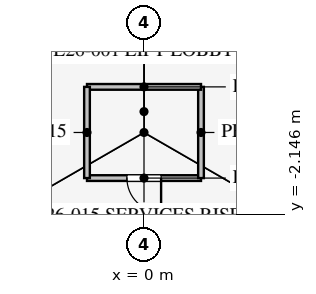
"""IFC4 building model, lengths in metres.
Left out: names, types, materials, properties, quantities, classifications, styles, units other than length and angle.
Written with IfcOpenShell. Run it as: python <this file> out.ifc"""

import sys

from ifc_helpers import new_model, si_unit, direction, frame, frame_2d, origin, place, context, subcontext, project, spatial, rectangle, extrude, element, fill, save


model = new_model("IFC4")
c1 = context("Model", 3, precision=1e-05, world=origin(), true_north=direction((0.0, 1.0)))
c2 = subcontext(c1, "Body", "Model", "MODEL_VIEW")
j1 = project(units=[si_unit("LENGTHUNIT", "METRE"), si_unit("PLANEANGLEUNIT", "RADIAN")], contexts=[c1])
p1 = place(None, origin())
s1 = spatial("IfcSite", under=j1, at=p1, CompositionType="ELEMENT")
p2 = place(p1, origin())
s2 = spatial("IfcBuilding", under=s1, at=p2, CompositionType="ELEMENT")
p3 = place(p2, frame((0.0, 0.0, 115.7)))
s3 = spatial("IfcBuildingStorey", under=s2, at=p3, CompositionType="ELEMENT", Elevation=115.7)
p4 = place(p3, frame((-1.5, -1.2, 0.0), z_axis=(0.0, 0.0, 1.0), x_axis=(1.0, 0.0, 0.0)))
e1 = element("IfcWall", 1, at=p4, inside=s3, PredefinedType="PARTITIONING", context=c2, shape_type="SweptSolid", body=[
    extrude(rectangle(XDim=3.0, YDim=0.15, at=frame_2d((1.5, 0.0))), origin(), (0.0, 0.0, 1.0), 4.0),
])
p5 = place(p4, frame((1.05, 0.0, 0.0)))
e2 = element("IfcOpeningElement", 2, at=p5, cuts=e1, PredefinedType="OPENING", context=c2, shape_type="SweptSolid", body=[
    extrude(rectangle(XDim=0.9, YDim=2.1, at=frame_2d((0.45, 1.05))), frame((0.0, 0.085, 0.0), z_axis=(0.0, -1.0, 0.0), x_axis=(1.0, 0.0, 0.0)), (0.0, 0.0, 1.0), 0.17),
])
p6 = place(p3, frame((1.5, -1.2, 0.0), z_axis=(0.0, 0.0, 1.0), x_axis=(0.0, 1.0, 0.0)))
e3 = element("IfcWall", 3, at=p6, inside=s3, PredefinedType="PARTITIONING", context=c2, shape_type="SweptSolid", body=[
    extrude(rectangle(XDim=2.4, YDim=0.15, at=frame_2d((1.2, 0.0))), origin(), (0.0, 0.0, 1.0), 4.0),
])
p7 = place(p3, frame((1.5, 1.2, 0.0), z_axis=(0.0, 0.0, 1.0), x_axis=(-1.0, 0.0, 0.0)))
e4 = element("IfcWall", 4, at=p7, inside=s3, PredefinedType="PARTITIONING", context=c2, shape_type="SweptSolid", body=[
    extrude(rectangle(XDim=3.0, YDim=0.15, at=frame_2d((1.5, 0.0))), origin(), (0.0, 0.0, 1.0), 4.0),
])
p8 = place(p3, frame((-1.5, 1.2, 0.0), z_axis=(0.0, 0.0, 1.0), x_axis=(0.0, -1.0, 0.0)))
e5 = element("IfcWall", 5, at=p8, inside=s3, PredefinedType="PARTITIONING", context=c2, shape_type="SweptSolid", body=[
    extrude(rectangle(XDim=2.4, YDim=0.15, at=frame_2d((1.2, 0.0))), origin(), (0.0, 0.0, 1.0), 4.0),
])
p9 = place(p3, frame((26.415, -15.231, 0.0), z_axis=(0.0, 0.0, 1.0), x_axis=(-0.50000091641, 0.866024874695, 0.0)))
e6 = element("IfcWall", 6, at=p9, inside=s3, PredefinedType="PARTITIONING", context=c2, shape_type="SweptSolid", body=[
    extrude(rectangle(XDim=52.796, YDim=0.12, at=frame_2d((26.398, 0.0))), origin(), (0.0, 0.0, 1.0), 2.9),
])
p10 = place(p9, frame((10.2, 0.0, 0.15)))
e7 = element("IfcOpeningElement", 7, at=p10, cuts=e6, PredefinedType="OPENING", context=c2, shape_type="SweptSolid", body=[
    extrude(rectangle(XDim=1.8, YDim=2.1, at=frame_2d((0.9, 1.05))), frame((0.0, 0.07, 0.0), z_axis=(0.0, -1.0, 0.0), x_axis=(1.0, 0.0, 0.0)), (0.0, 0.0, 1.0), 0.14),
])
p11 = place(p9, frame((40.8, 0.0, 0.15)))
e8 = element("IfcOpeningElement", 8, at=p11, cuts=e6, PredefinedType="OPENING", context=c2, shape_type="SweptSolid", body=[
    extrude(rectangle(XDim=1.8, YDim=2.1, at=frame_2d((0.9, 1.05))), frame((0.0, 0.07, 0.0), z_axis=(0.0, -1.0, 0.0), x_axis=(1.0, 0.0, 0.0)), (0.0, 0.0, 1.0), 0.14),
])
p12 = place(p3, frame((-0.016, 30.491, 0.0), z_axis=(0.0, 0.0, 1.0), x_axis=(-0.50000091641, -0.866024874695, 0.0)))
e9 = element("IfcWall", 9, at=p12, inside=s3, PredefinedType="PARTITIONING", context=c2, shape_type="SweptSolid", body=[
    extrude(rectangle(XDim=52.796, YDim=0.12, at=frame_2d((26.398, 0.0))), origin(), (0.0, 0.0, 1.0), 2.9),
])
p13 = place(p12, frame((10.2, 0.0, 0.15)))
e10 = element("IfcOpeningElement", 10, at=p13, cuts=e9, PredefinedType="OPENING", context=c2, shape_type="SweptSolid", body=[
    extrude(rectangle(XDim=1.8, YDim=2.1, at=frame_2d((0.9, 1.05))), frame((0.0, 0.07, 0.0), z_axis=(0.0, -1.0, 0.0), x_axis=(1.0, 0.0, 0.0)), (0.0, 0.0, 1.0), 0.14),
])
p14 = place(p12, frame((40.8, 0.0, 0.15)))
e11 = element("IfcOpeningElement", 11, at=p14, cuts=e9, PredefinedType="OPENING", context=c2, shape_type="SweptSolid", body=[
    extrude(rectangle(XDim=1.8, YDim=2.1, at=frame_2d((0.9, 1.05))), frame((0.0, 0.07, 0.0), z_axis=(0.0, -1.0, 0.0), x_axis=(1.0, 0.0, 0.0)), (0.0, 0.0, 1.0), 0.14),
])
p15 = place(p5, frame((0.9, 0.0, 0.0), z_axis=(0.0, 0.0, 1.0), x_axis=(-1.0, 0.0, 0.0)))
e12 = element("IfcDoor", 12, at=p15, inside=s3, OperationType="SINGLE_SWING_LEFT", PredefinedType="DOOR", context=c2, shape_type="SweptSolid", body=[
    extrude(rectangle(XDim=0.9, YDim=2.1, at=frame_2d((0.45, 1.05))), frame((0.0, 0.025, 0.0), z_axis=(0.0, -1.0, 0.0), x_axis=(1.0, 0.0, 0.0)), (0.0, 0.0, 1.0), 0.05),
])
fill(e2, e12)
save(model, sys.argv[1])
